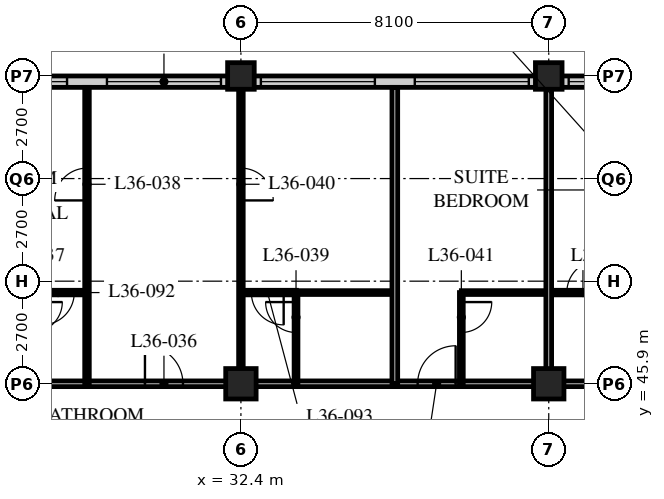
"""IFC4 building model, lengths in metres.
Left out: names, types, materials, properties, quantities, classifications, styles, units other than length and angle.
Written with IfcOpenShell. Run it as: python <this file> out.ifc"""

import sys

from ifc_helpers import new_model, si_unit, direction, frame, frame_2d, origin, origin_2d, place, context, subcontext, project, spatial, rectangle, hollow_rectangle, extrude, element, fill, save


model = new_model("IFC4")
c1 = context("Model", 3, precision=1e-05, world=origin(), true_north=direction((0.0, 1.0)))
c2 = subcontext(c1, "Body", "Model", "MODEL_VIEW")
j1 = project(units=[si_unit("LENGTHUNIT", "METRE"), si_unit("PLANEANGLEUNIT", "RADIAN")], contexts=[c1])
p1 = place(None, origin())
s1 = spatial("IfcSite", under=j1, at=p1, CompositionType="ELEMENT")
p2 = place(p1, origin())
s2 = spatial("IfcBuilding", under=s1, at=p2, CompositionType="ELEMENT")
p3 = place(p2, frame((0.0, 0.0, 140.8)))
s3 = spatial("IfcBuildingStorey", under=s2, at=p3, CompositionType="ELEMENT", Elevation=140.8)
p4 = place(p3, frame((32.4, 45.9, 0.0), z_axis=(0.0, 0.0, 1.0), x_axis=(1.0, 0.0, 0.0)))
e1 = element("IfcColumn", 1, at=p4, inside=s3, PredefinedType="COLUMN", context=c2, shape_type="SweptSolid", body=[
    extrude(hollow_rectangle(XDim=0.8, YDim=0.8, WallThickness=0.08, at=origin_2d()), origin(), (0.0, 0.0, 1.0), 3.4),
])
p5 = place(p3, frame((32.4, 54.0, 0.0), z_axis=(0.0, 0.0, 1.0), x_axis=(1.0, 0.0, 0.0)))
e2 = element("IfcColumn", 2, at=p5, inside=s3, PredefinedType="COLUMN", context=c2, shape_type="SweptSolid", body=[
    extrude(hollow_rectangle(XDim=0.7, YDim=0.7, WallThickness=0.07, at=origin_2d()), origin(), (0.0, 0.0, 1.0), 3.4),
])
p6 = place(p3, frame((40.5, 45.9, 0.0), z_axis=(0.0, 0.0, 1.0), x_axis=(1.0, 0.0, 0.0)))
e3 = element("IfcColumn", 3, at=p6, inside=s3, PredefinedType="COLUMN", context=c2, shape_type="SweptSolid", body=[
    extrude(hollow_rectangle(XDim=0.8, YDim=0.8, WallThickness=0.08, at=origin_2d()), origin(), (0.0, 0.0, 1.0), 3.4),
])
p7 = place(p3, frame((40.5, 54.0, 0.0), z_axis=(0.0, 0.0, 1.0), x_axis=(1.0, 0.0, 0.0)))
e4 = element("IfcColumn", 4, at=p7, inside=s3, PredefinedType="COLUMN", context=c2, shape_type="SweptSolid", body=[
    extrude(hollow_rectangle(XDim=0.7, YDim=0.7, WallThickness=0.07, at=origin_2d()), origin(), (0.0, 0.0, 1.0), 3.4),
])
p8 = place(p3, frame((48.3, 53.85, 0.0), z_axis=(0.0, 0.0, 1.0), x_axis=(-1.0, 0.0, 0.0)))
e5 = element("IfcWall", 5, at=p8, inside=s3, PredefinedType="SOLIDWALL", context=c2, shape_type="SweptSolid", body=[
    extrude(rectangle(XDim=40.2, YDim=0.3, at=frame_2d((20.1, 0.0))), origin(), (0.0, 0.0, 1.0), 3.19),
])
p9 = place(p8, frame((0.225, 0.0, 0.9)))
e6 = element("IfcOpeningElement", 6, at=p9, cuts=e5, PredefinedType="OPENING", context=c2, shape_type="SweptSolid", body=[
    extrude(rectangle(XDim=3.0, YDim=2.0, at=frame_2d((1.5, 1.0))), frame((0.0, 0.16, 0.0), z_axis=(0.0, -1.0, 0.0), x_axis=(1.0, 0.0, 0.0)), (0.0, 0.0, 1.0), 0.32),
])
p10 = place(p8, frame((4.275, 0.0, 0.9)))
e7 = element("IfcOpeningElement", 7, at=p10, cuts=e5, PredefinedType="OPENING", context=c2, shape_type="SweptSolid", body=[
    extrude(rectangle(XDim=3.0, YDim=2.0, at=frame_2d((1.5, 1.0))), frame((0.0, 0.16, 0.0), z_axis=(0.0, -1.0, 0.0), x_axis=(1.0, 0.0, 0.0)), (0.0, 0.0, 1.0), 0.32),
])
p11 = place(p8, frame((8.325, 0.0, 0.9)))
e8 = element("IfcOpeningElement", 8, at=p11, cuts=e5, PredefinedType="OPENING", context=c2, shape_type="SweptSolid", body=[
    extrude(rectangle(XDim=3.0, YDim=2.0, at=frame_2d((1.5, 1.0))), frame((0.0, 0.16, 0.0), z_axis=(0.0, -1.0, 0.0), x_axis=(1.0, 0.0, 0.0)), (0.0, 0.0, 1.0), 0.32),
])
p12 = place(p8, frame((12.375, 0.0, 0.9)))
e9 = element("IfcOpeningElement", 9, at=p12, cuts=e5, PredefinedType="OPENING", context=c2, shape_type="SweptSolid", body=[
    extrude(rectangle(XDim=3.0, YDim=2.0, at=frame_2d((1.5, 1.0))), frame((0.0, 0.16, 0.0), z_axis=(0.0, -1.0, 0.0), x_axis=(1.0, 0.0, 0.0)), (0.0, 0.0, 1.0), 0.32),
])
p13 = place(p8, frame((16.425, 0.0, 0.9)))
e10 = element("IfcOpeningElement", 10, at=p13, cuts=e5, PredefinedType="OPENING", context=c2, shape_type="SweptSolid", body=[
    extrude(rectangle(XDim=3.0, YDim=2.0, at=frame_2d((1.5, 1.0))), frame((0.0, 0.16, 0.0), z_axis=(0.0, -1.0, 0.0), x_axis=(1.0, 0.0, 0.0)), (0.0, 0.0, 1.0), 0.32),
])
p14 = place(p8, frame((20.475, 0.0, 0.9)))
e11 = element("IfcOpeningElement", 11, at=p14, cuts=e5, PredefinedType="OPENING", context=c2, shape_type="SweptSolid", body=[
    extrude(rectangle(XDim=3.0, YDim=2.0, at=frame_2d((1.5, 1.0))), frame((0.0, 0.16, 0.0), z_axis=(0.0, -1.0, 0.0), x_axis=(1.0, 0.0, 0.0)), (0.0, 0.0, 1.0), 0.32),
])
p15 = place(p8, frame((24.525, 0.0, 0.9)))
e12 = element("IfcOpeningElement", 12, at=p15, cuts=e5, PredefinedType="OPENING", context=c2, shape_type="SweptSolid", body=[
    extrude(rectangle(XDim=3.0, YDim=2.0, at=frame_2d((1.5, 1.0))), frame((0.0, 0.16, 0.0), z_axis=(0.0, -1.0, 0.0), x_axis=(1.0, 0.0, 0.0)), (0.0, 0.0, 1.0), 0.32),
])
p16 = place(p8, frame((28.575, 0.0, 0.9)))
e13 = element("IfcOpeningElement", 13, at=p16, cuts=e5, PredefinedType="OPENING", context=c2, shape_type="SweptSolid", body=[
    extrude(rectangle(XDim=3.0, YDim=2.0, at=frame_2d((1.5, 1.0))), frame((0.0, 0.16, 0.0), z_axis=(0.0, -1.0, 0.0), x_axis=(1.0, 0.0, 0.0)), (0.0, 0.0, 1.0), 0.32),
])
p17 = place(p8, frame((32.625, 0.0, 0.9)))
e14 = element("IfcOpeningElement", 14, at=p17, cuts=e5, PredefinedType="OPENING", context=c2, shape_type="SweptSolid", body=[
    extrude(rectangle(XDim=3.0, YDim=2.0, at=frame_2d((1.5, 1.0))), frame((0.0, 0.16, 0.0), z_axis=(0.0, -1.0, 0.0), x_axis=(1.0, 0.0, 0.0)), (0.0, 0.0, 1.0), 0.32),
])
p18 = place(p8, frame((36.675, 0.0, 0.9)))
e15 = element("IfcOpeningElement", 15, at=p18, cuts=e5, PredefinedType="OPENING", context=c2, shape_type="SweptSolid", body=[
    extrude(rectangle(XDim=3.0, YDim=2.0, at=frame_2d((1.5, 1.0))), frame((0.0, 0.16, 0.0), z_axis=(0.0, -1.0, 0.0), x_axis=(1.0, 0.0, 0.0)), (0.0, 0.0, 1.0), 0.32),
])
p19 = place(p3, frame((8.1, 45.9, 0.0), z_axis=(0.0, 0.0, 1.0), x_axis=(1.0, 0.0, 0.0)))
e16 = element("IfcWall", 16, at=p19, inside=s3, PredefinedType="PARTITIONING", context=c2, shape_type="SweptSolid", body=[
    extrude(rectangle(XDim=36.45, YDim=0.15, at=frame_2d((18.225, 0.0))), origin(), (0.0, 0.0, 1.0), 2.578),
])
p20 = place(p19, frame((9.625, 0.0, 0.0)))
e17 = element("IfcOpeningElement", 17, at=p20, cuts=e16, PredefinedType="OPENING", context=c2, shape_type="SweptSolid", body=[
    extrude(rectangle(XDim=1.0, YDim=2.1, at=frame_2d((0.5, 1.05))), frame((0.0, 0.085, 0.0), z_axis=(0.0, -1.0, 0.0), x_axis=(1.0, 0.0, 0.0)), (0.0, 0.0, 1.0), 0.17),
])
p21 = place(p19, frame((21.775, 0.0, 0.0)))
e18 = element("IfcOpeningElement", 18, at=p21, cuts=e16, PredefinedType="OPENING", context=c2, shape_type="SweptSolid", body=[
    extrude(rectangle(XDim=1.0, YDim=2.1, at=frame_2d((0.5, 1.05))), frame((0.0, 0.085, 0.0), z_axis=(0.0, -1.0, 0.0), x_axis=(1.0, 0.0, 0.0)), (0.0, 0.0, 1.0), 0.17),
])
p22 = place(p19, frame((28.95, 0.0, 0.0)))
e19 = element("IfcOpeningElement", 19, at=p22, cuts=e16, PredefinedType="OPENING", context=c2, shape_type="SweptSolid", body=[
    extrude(rectangle(XDim=1.0, YDim=2.1, at=frame_2d((0.5, 1.05))), frame((0.0, 0.085, 0.0), z_axis=(0.0, -1.0, 0.0), x_axis=(1.0, 0.0, 0.0)), (0.0, 0.0, 1.0), 0.17),
])
p23 = place(p19, frame((33.925, 0.0, 0.0)))
e20 = element("IfcOpeningElement", 20, at=p23, cuts=e16, PredefinedType="OPENING", context=c2, shape_type="SweptSolid", body=[
    extrude(rectangle(XDim=1.0, YDim=2.1, at=frame_2d((0.5, 1.05))), frame((0.0, 0.085, 0.0), z_axis=(0.0, -1.0, 0.0), x_axis=(1.0, 0.0, 0.0)), (0.0, 0.0, 1.0), 0.17),
])
p24 = place(p19, frame((2.625, 0.0, 0.0)))
e21 = element("IfcOpeningElement", 21, at=p24, cuts=e16, PredefinedType="OPENING", context=c2, shape_type="SweptSolid", body=[
    extrude(rectangle(XDim=1.0, YDim=2.1, at=frame_2d((0.5, 1.05))), frame((0.0, 0.085, 0.0), z_axis=(0.0, -1.0, 0.0), x_axis=(1.0, 0.0, 0.0)), (0.0, 0.0, 1.0), 0.17),
])
p25 = place(p3, frame((28.35, 45.9, 0.0), z_axis=(0.0, 0.0, 1.0), x_axis=(0.0, 1.0, 0.0)))
e22 = element("IfcWall", 22, at=p25, inside=s3, PredefinedType="PARTITIONING", context=c2, shape_type="SweptSolid", body=[
    extrude(rectangle(XDim=7.8, YDim=0.12, at=frame_2d((3.9, 0.0))), origin(), (0.0, 0.0, 1.0), 3.19),
])
p26 = place(p25, frame((4.825, 0.0, 0.0)))
e23 = element("IfcOpeningElement", 23, at=p26, cuts=e22, PredefinedType="OPENING", context=c2, shape_type="SweptSolid", body=[
    extrude(rectangle(XDim=0.85, YDim=2.1, at=frame_2d((0.425, 1.05))), frame((0.0, 0.07, 0.0), z_axis=(0.0, -1.0, 0.0), x_axis=(1.0, 0.0, 0.0)), (0.0, 0.0, 1.0), 0.14),
])
p27 = place(p3, frame((33.85, 48.3, 0.0), z_axis=(0.0, 0.0, 1.0), x_axis=(1.0, 0.0, 0.0)))
e24 = element("IfcWall", 24, at=p27, inside=s3, PredefinedType="PARTITIONING", context=c2, shape_type="SweptSolid", body=[
    extrude(rectangle(XDim=2.6, YDim=0.1, at=frame_2d((1.3, 0.0))), origin(), (0.0, 0.0, 1.0), 3.19),
])
p28 = place(p3, frame((33.85, 45.9, 0.0), z_axis=(0.0, 0.0, 1.0), x_axis=(0.0, 1.0, 0.0)))
e25 = element("IfcWall", 25, at=p28, inside=s3, PredefinedType="PARTITIONING", context=c2, shape_type="SweptSolid", body=[
    extrude(rectangle(XDim=2.4, YDim=0.1, at=frame_2d((1.2, 0.0))), origin(), (0.0, 0.0, 1.0), 3.19),
])
p29 = place(p28, frame((1.35, 0.0, 0.0)))
e26 = element("IfcOpeningElement", 26, at=p29, cuts=e25, PredefinedType="OPENING", context=c2, shape_type="SweptSolid", body=[
    extrude(rectangle(XDim=0.8, YDim=2.1, at=frame_2d((0.4, 1.05))), frame((0.0, 0.06, 0.0), z_axis=(0.0, -1.0, 0.0), x_axis=(1.0, 0.0, 0.0)), (0.0, 0.0, 1.0), 0.12),
])
p30 = place(p3, frame((32.4, 45.9, 0.0), z_axis=(0.0, 0.0, 1.0), x_axis=(0.0, 1.0, 0.0)))
e27 = element("IfcWall", 27, at=p30, inside=s3, PredefinedType="PARTITIONING", context=c2, shape_type="SweptSolid", body=[
    extrude(rectangle(XDim=7.8, YDim=0.12, at=frame_2d((3.9, 0.0))), origin(), (0.0, 0.0, 1.0), 2.578),
])
p31 = place(p30, frame((4.825, 0.0, 0.0)))
e28 = element("IfcOpeningElement", 28, at=p31, cuts=e27, PredefinedType="OPENING", context=c2, shape_type="SweptSolid", body=[
    extrude(rectangle(XDim=0.85, YDim=2.1, at=frame_2d((0.425, 1.05))), frame((0.0, 0.07, 0.0), z_axis=(0.0, -1.0, 0.0), x_axis=(1.0, 0.0, 0.0)), (0.0, 0.0, 1.0), 0.14),
])
p32 = place(p3, frame((36.45, 45.9, 0.0), z_axis=(0.0, 0.0, 1.0), x_axis=(0.0, 1.0, 0.0)))
e29 = element("IfcWall", 29, at=p32, inside=s3, PredefinedType="PARTITIONING", context=c2, shape_type="SweptSolid", body=[
    extrude(rectangle(XDim=7.8, YDim=0.15, at=frame_2d((3.9, 0.0))), origin(), (0.0, 0.0, 1.0), 3.19),
])
p33 = place(p3, frame((38.2, 48.3, 0.0), z_axis=(0.0, 0.0, 1.0), x_axis=(1.0, 0.0, 0.0)))
e30 = element("IfcWall", 30, at=p33, inside=s3, PredefinedType="PARTITIONING", context=c2, shape_type="SweptSolid", body=[
    extrude(rectangle(XDim=2.3, YDim=0.1, at=frame_2d((1.15, 0.0))), origin(), (0.0, 0.0, 1.0), 3.19),
])
p34 = place(p3, frame((38.2, 45.9, 0.0), z_axis=(0.0, 0.0, 1.0), x_axis=(0.0, 1.0, 0.0)))
e31 = element("IfcWall", 31, at=p34, inside=s3, PredefinedType="PARTITIONING", context=c2, shape_type="SweptSolid", body=[
    extrude(rectangle(XDim=2.4, YDim=0.1, at=frame_2d((1.2, 0.0))), origin(), (0.0, 0.0, 1.0), 3.19),
])
p35 = place(p34, frame((1.35, 0.0, 0.0)))
e32 = element("IfcOpeningElement", 32, at=p35, cuts=e31, PredefinedType="OPENING", context=c2, shape_type="SweptSolid", body=[
    extrude(rectangle(XDim=0.8, YDim=2.1, at=frame_2d((0.4, 1.05))), frame((0.0, 0.06, 0.0), z_axis=(0.0, -1.0, 0.0), x_axis=(1.0, 0.0, 0.0)), (0.0, 0.0, 1.0), 0.12),
])
p36 = place(p3, frame((40.5, 48.3, 0.0), z_axis=(0.0, 0.0, 1.0), x_axis=(1.0, 0.0, 0.0)))
e33 = element("IfcWall", 33, at=p36, inside=s3, PredefinedType="PARTITIONING", context=c2, shape_type="SweptSolid", body=[
    extrude(rectangle(XDim=8.05, YDim=0.12, at=frame_2d((4.025, 0.0))), origin(), (0.0, 0.0, 1.0), 3.19),
])
p37 = place(p36, frame((0.475, 0.0, 0.0)))
e34 = element("IfcOpeningElement", 34, at=p37, cuts=e33, PredefinedType="OPENING", context=c2, shape_type="SweptSolid", body=[
    extrude(rectangle(XDim=0.85, YDim=2.1, at=frame_2d((0.425, 1.05))), frame((0.0, 0.07, 0.0), z_axis=(0.0, -1.0, 0.0), x_axis=(1.0, 0.0, 0.0)), (0.0, 0.0, 1.0), 0.14),
])
p38 = place(p36, frame((4.325, 0.0, 0.0)))
e35 = element("IfcOpeningElement", 35, at=p38, cuts=e33, PredefinedType="OPENING", context=c2, shape_type="SweptSolid", body=[
    extrude(rectangle(XDim=0.85, YDim=2.1, at=frame_2d((0.425, 1.05))), frame((0.0, 0.07, 0.0), z_axis=(0.0, -1.0, 0.0), x_axis=(1.0, 0.0, 0.0)), (0.0, 0.0, 1.0), 0.14),
])
p39 = place(p3, frame((40.5, 45.9, 0.0), z_axis=(0.0, 0.0, 1.0), x_axis=(0.0, 1.0, 0.0)))
e36 = element("IfcWall", 36, at=p39, inside=s3, PredefinedType="PARTITIONING", context=c2, shape_type="SweptSolid", body=[
    extrude(rectangle(XDim=7.8, YDim=0.15, at=frame_2d((3.9, 0.0))), origin(), (0.0, 0.0, 1.0), 2.578),
])
p40 = place(p3, frame((26.89, 48.3, 0.0), z_axis=(0.0, 0.0, 1.0), x_axis=(1.0, 0.0, 0.0)))
e37 = element("IfcWall", 37, at=p40, inside=s3, PredefinedType="PARTITIONING", context=c2, shape_type="SweptSolid", body=[
    extrude(rectangle(XDim=1.46, YDim=0.12, at=frame_2d((0.73, 0.0))), origin(), (0.0, 0.0, 1.0), 3.19),
])
p41 = place(p40, frame((0.275, 0.0, 0.0)))
e38 = element("IfcOpeningElement", 38, at=p41, cuts=e37, PredefinedType="OPENING", context=c2, shape_type="SweptSolid", body=[
    extrude(rectangle(XDim=0.85, YDim=2.1, at=frame_2d((0.425, 1.05))), frame((0.0, 0.07, 0.0), z_axis=(0.0, -1.0, 0.0), x_axis=(1.0, 0.0, 0.0)), (0.0, 0.0, 1.0), 0.14),
])
p42 = place(p3, frame((32.4, 48.3, 0.0), z_axis=(0.0, 0.0, 1.0), x_axis=(1.0, 0.0, 0.0)))
e39 = element("IfcWall", 39, at=p42, inside=s3, PredefinedType="PARTITIONING", context=c2, shape_type="SweptSolid", body=[
    extrude(rectangle(XDim=1.46, YDim=0.12, at=frame_2d((0.73, 0.0))), origin(), (0.0, 0.0, 1.0), 3.19),
])
p43 = place(p42, frame((0.275, 0.0, 0.0)))
e40 = element("IfcOpeningElement", 40, at=p43, cuts=e39, PredefinedType="OPENING", context=c2, shape_type="SweptSolid", body=[
    extrude(rectangle(XDim=0.85, YDim=2.1, at=frame_2d((0.425, 1.05))), frame((0.0, 0.07, 0.0), z_axis=(0.0, -1.0, 0.0), x_axis=(1.0, 0.0, 0.0)), (0.0, 0.0, 1.0), 0.14),
])
p44 = place(p10, origin())
e41 = element("IfcWindow", 41, at=p44, inside=s3, PartitioningType="SINGLE_PANEL", PredefinedType="WINDOW", context=c2, shape_type="SweptSolid", body=[
    extrude(rectangle(XDim=3.0, YDim=2.0, at=frame_2d((1.5, 1.0))), frame((0.0, 0.03, 0.0), z_axis=(0.0, -1.0, 0.0), x_axis=(1.0, 0.0, 0.0)), (0.0, 0.0, 1.0), 0.06),
])
fill(e7, e41)
p45 = place(p11, origin())
e42 = element("IfcWindow", 42, at=p45, inside=s3, PartitioningType="SINGLE_PANEL", PredefinedType="WINDOW", context=c2, shape_type="SweptSolid", body=[
    extrude(rectangle(XDim=3.0, YDim=2.0, at=frame_2d((1.5, 1.0))), frame((0.0, 0.03, 0.0), z_axis=(0.0, -1.0, 0.0), x_axis=(1.0, 0.0, 0.0)), (0.0, 0.0, 1.0), 0.06),
])
fill(e8, e42)
p46 = place(p12, origin())
e43 = element("IfcWindow", 43, at=p46, inside=s3, PartitioningType="SINGLE_PANEL", PredefinedType="WINDOW", context=c2, shape_type="SweptSolid", body=[
    extrude(rectangle(XDim=3.0, YDim=2.0, at=frame_2d((1.5, 1.0))), frame((0.0, 0.03, 0.0), z_axis=(0.0, -1.0, 0.0), x_axis=(1.0, 0.0, 0.0)), (0.0, 0.0, 1.0), 0.06),
])
fill(e9, e43)
p47 = place(p13, origin())
e44 = element("IfcWindow", 44, at=p47, inside=s3, PartitioningType="SINGLE_PANEL", PredefinedType="WINDOW", context=c2, shape_type="SweptSolid", body=[
    extrude(rectangle(XDim=3.0, YDim=2.0, at=frame_2d((1.5, 1.0))), frame((0.0, 0.03, 0.0), z_axis=(0.0, -1.0, 0.0), x_axis=(1.0, 0.0, 0.0)), (0.0, 0.0, 1.0), 0.06),
])
fill(e10, e44)
p48 = place(p14, origin())
e45 = element("IfcWindow", 45, at=p48, inside=s3, PartitioningType="SINGLE_PANEL", PredefinedType="WINDOW", context=c2, shape_type="SweptSolid", body=[
    extrude(rectangle(XDim=3.0, YDim=2.0, at=frame_2d((1.5, 1.0))), frame((0.0, 0.03, 0.0), z_axis=(0.0, -1.0, 0.0), x_axis=(1.0, 0.0, 0.0)), (0.0, 0.0, 1.0), 0.06),
])
fill(e11, e45)
p49 = place(p21, origin())
e46 = element("IfcDoor", 46, at=p49, inside=s3, OperationType="SINGLE_SWING_LEFT", PredefinedType="DOOR", context=c2, shape_type="SweptSolid", body=[
    extrude(rectangle(XDim=1.0, YDim=2.1, at=frame_2d((0.5, 1.05))), frame((0.0, 0.025, 0.0), z_axis=(0.0, -1.0, 0.0), x_axis=(1.0, 0.0, 0.0)), (0.0, 0.0, 1.0), 0.05),
])
fill(e18, e46)
p50 = place(p26, origin())
e47 = element("IfcDoor", 47, at=p50, inside=s3, OperationType="SINGLE_SWING_LEFT", PredefinedType="DOOR", context=c2, shape_type="SweptSolid", body=[
    extrude(rectangle(XDim=0.85, YDim=2.1, at=frame_2d((0.425, 1.05))), frame((0.0, 0.025, 0.0), z_axis=(0.0, -1.0, 0.0), x_axis=(1.0, 0.0, 0.0)), (0.0, 0.0, 1.0), 0.05),
])
fill(e23, e47)
p51 = place(p29, origin())
e48 = element("IfcDoor", 48, at=p51, inside=s3, OperationType="SINGLE_SWING_RIGHT", PredefinedType="DOOR", context=c2, shape_type="SweptSolid", body=[
    extrude(rectangle(XDim=0.8, YDim=2.1, at=frame_2d((0.4, 1.05))), frame((0.0, 0.025, 0.0), z_axis=(0.0, -1.0, 0.0), x_axis=(1.0, 0.0, 0.0)), (0.0, 0.0, 1.0), 0.05),
])
fill(e26, e48)
p52 = place(p31, origin())
e49 = element("IfcDoor", 49, at=p52, inside=s3, OperationType="SINGLE_SWING_RIGHT", PredefinedType="DOOR", context=c2, shape_type="SweptSolid", body=[
    extrude(rectangle(XDim=0.85, YDim=2.1, at=frame_2d((0.425, 1.05))), frame((0.0, 0.025, 0.0), z_axis=(0.0, -1.0, 0.0), x_axis=(1.0, 0.0, 0.0)), (0.0, 0.0, 1.0), 0.05),
])
fill(e28, e49)
p53 = place(p35, origin())
e50 = element("IfcDoor", 50, at=p53, inside=s3, OperationType="SINGLE_SWING_LEFT", PredefinedType="DOOR", context=c2, shape_type="SweptSolid", body=[
    extrude(rectangle(XDim=0.8, YDim=2.1, at=frame_2d((0.4, 1.05))), frame((0.0, 0.025, 0.0), z_axis=(0.0, -1.0, 0.0), x_axis=(1.0, 0.0, 0.0)), (0.0, 0.0, 1.0), 0.05),
])
fill(e32, e50)
p54 = place(p22, origin())
e51 = element("IfcDoor", 51, at=p54, inside=s3, OperationType="SINGLE_SWING_RIGHT", PredefinedType="DOOR", context=c2, shape_type="SweptSolid", body=[
    extrude(rectangle(XDim=1.0, YDim=2.1, at=frame_2d((0.5, 1.05))), frame((0.0, 0.025, 0.0), z_axis=(0.0, -1.0, 0.0), x_axis=(1.0, 0.0, 0.0)), (0.0, 0.0, 1.0), 0.05),
])
fill(e19, e51)
p55 = place(p37, origin())
e52 = element("IfcDoor", 52, at=p55, inside=s3, OperationType="SINGLE_SWING_RIGHT", PredefinedType="DOOR", context=c2, shape_type="SweptSolid", body=[
    extrude(rectangle(XDim=0.85, YDim=2.1, at=frame_2d((0.425, 1.05))), frame((0.0, 0.025, 0.0), z_axis=(0.0, -1.0, 0.0), x_axis=(1.0, 0.0, 0.0)), (0.0, 0.0, 1.0), 0.05),
])
fill(e34, e52)
p56 = place(p41, origin())
e53 = element("IfcDoor", 53, at=p56, inside=s3, OperationType="SINGLE_SWING_RIGHT", PredefinedType="DOOR", context=c2, shape_type="SweptSolid", body=[
    extrude(rectangle(XDim=0.85, YDim=2.1, at=frame_2d((0.425, 1.05))), frame((0.0, 0.025, 0.0), z_axis=(0.0, -1.0, 0.0), x_axis=(1.0, 0.0, 0.0)), (0.0, 0.0, 1.0), 0.05),
])
fill(e38, e53)
p57 = place(p43, origin())
e54 = element("IfcDoor", 54, at=p57, inside=s3, OperationType="SINGLE_SWING_LEFT", PredefinedType="DOOR", context=c2, shape_type="SweptSolid", body=[
    extrude(rectangle(XDim=0.85, YDim=2.1, at=frame_2d((0.425, 1.05))), frame((0.0, 0.025, 0.0), z_axis=(0.0, -1.0, 0.0), x_axis=(1.0, 0.0, 0.0)), (0.0, 0.0, 1.0), 0.05),
])
fill(e40, e54)
save(model, sys.argv[1])
